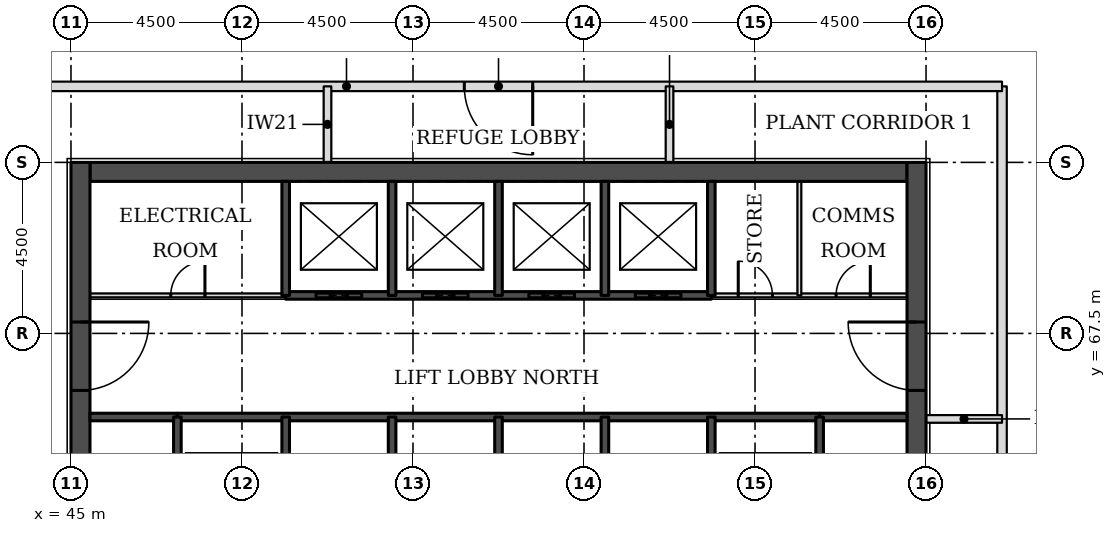
"""IFC4 building model, lengths in metres.
Left out: names, types, materials, properties, quantities, classifications, styles, units other than length and angle.
Written with IfcOpenShell. Run it as: python <this file> out.ifc"""

import sys

from ifc_helpers import new_model, si_unit, direction, frame, frame_2d, origin, place, context, subcontext, project, spatial, rectangle, extrude, element, fill, save


model = new_model("IFC4")
c1 = context("Model", 3, precision=1e-05, world=origin(), true_north=direction((0.0, 1.0)))
c2 = subcontext(c1, "Body", "Model", "MODEL_VIEW")
j1 = project(units=[si_unit("LENGTHUNIT", "METRE"), si_unit("PLANEANGLEUNIT", "RADIAN")], contexts=[c1])
p1 = place(None, origin())
s1 = spatial("IfcSite", under=j1, at=p1, CompositionType="ELEMENT")
p2 = place(p1, origin())
s2 = spatial("IfcBuilding", under=s1, at=p2, CompositionType="ELEMENT")
p3 = place(p2, frame((0.0, 0.0, 69.3)))
s3 = spatial("IfcBuildingStorey", under=s2, at=p3, CompositionType="ELEMENT", Elevation=69.3)
p4 = place(p3, frame((45.5, 71.75, 0.0), z_axis=(0.0, 0.0, 1.0), x_axis=(1.0, 0.0, 0.0)))
e1 = element("IfcWall", 1, at=p4, inside=s3, PredefinedType="SHEAR", context=c2, shape_type="SweptSolid", body=[
    extrude(rectangle(XDim=21.5, YDim=0.5, at=frame_2d((10.75, 0.0))), origin(), (0.0, 0.0, 1.0), 5.0),
])
p5 = place(p3, frame((45.25, 49.5, 0.0), z_axis=(0.0, 0.0, 1.0), x_axis=(0.0, 1.0, 0.0)))
e2 = element("IfcWall", 2, at=p5, inside=s3, PredefinedType="SHEAR", context=c2, shape_type="SweptSolid", body=[
    extrude(rectangle(XDim=22.5, YDim=0.5, at=frame_2d((11.25, 0.0))), origin(), (0.0, 0.0, 1.0), 5.0),
])
p6 = place(p5, frame((4.2, 0.0, 0.0)))
e3 = element("IfcOpeningElement", 3, at=p6, cuts=e2, PredefinedType="OPENING", context=c2, shape_type="SweptSolid", body=[
    extrude(rectangle(XDim=1.8, YDim=2.1, at=frame_2d((0.9, 1.05))), frame((0.0, 0.26, 0.0), z_axis=(0.0, -1.0, 0.0), x_axis=(1.0, 0.0, 0.0)), (0.0, 0.0, 1.0), 0.52),
])
p7 = place(p5, frame((6.9, 0.0, 0.0)))
e4 = element("IfcOpeningElement", 4, at=p7, cuts=e2, PredefinedType="OPENING", context=c2, shape_type="SweptSolid", body=[
    extrude(rectangle(XDim=1.1, YDim=2.1, at=frame_2d((0.55, 1.05))), frame((0.0, 0.26, 0.0), z_axis=(0.0, -1.0, 0.0), x_axis=(1.0, 0.0, 0.0)), (0.0, 0.0, 1.0), 0.52),
])
p8 = place(p5, frame((13.6, 0.0, 0.0)))
e5 = element("IfcOpeningElement", 5, at=p8, cuts=e2, PredefinedType="OPENING", context=c2, shape_type="SweptSolid", body=[
    extrude(rectangle(XDim=1.1, YDim=2.1, at=frame_2d((0.55, 1.05))), frame((0.0, 0.26, 0.0), z_axis=(0.0, -1.0, 0.0), x_axis=(1.0, 0.0, 0.0)), (0.0, 0.0, 1.0), 0.52),
])
p9 = place(p5, frame((16.5, 0.0, 0.0)))
e6 = element("IfcOpeningElement", 6, at=p9, cuts=e2, PredefinedType="OPENING", context=c2, shape_type="SweptSolid", body=[
    extrude(rectangle(XDim=1.8, YDim=2.1, at=frame_2d((0.9, 1.05))), frame((0.0, 0.26, 0.0), z_axis=(0.0, -1.0, 0.0), x_axis=(1.0, 0.0, 0.0)), (0.0, 0.0, 1.0), 0.52),
])
p10 = place(p3, frame((67.25, 49.5, 0.0), z_axis=(0.0, 0.0, 1.0), x_axis=(0.0, 1.0, 0.0)))
e7 = element("IfcWall", 7, at=p10, inside=s3, PredefinedType="SHEAR", context=c2, shape_type="SweptSolid", body=[
    extrude(rectangle(XDim=22.5, YDim=0.5, at=frame_2d((11.25, 0.0))), origin(), (0.0, 0.0, 1.0), 5.0),
])
p11 = place(p10, frame((4.2, 0.0, 0.0)))
e8 = element("IfcOpeningElement", 8, at=p11, cuts=e7, PredefinedType="OPENING", context=c2, shape_type="SweptSolid", body=[
    extrude(rectangle(XDim=1.8, YDim=2.1, at=frame_2d((0.9, 1.05))), frame((0.0, 0.26, 0.0), z_axis=(0.0, -1.0, 0.0), x_axis=(1.0, 0.0, 0.0)), (0.0, 0.0, 1.0), 0.52),
])
p12 = place(p10, frame((6.9, 0.0, 0.0)))
e9 = element("IfcOpeningElement", 9, at=p12, cuts=e7, PredefinedType="OPENING", context=c2, shape_type="SweptSolid", body=[
    extrude(rectangle(XDim=1.1, YDim=2.1, at=frame_2d((0.55, 1.05))), frame((0.0, 0.26, 0.0), z_axis=(0.0, -1.0, 0.0), x_axis=(1.0, 0.0, 0.0)), (0.0, 0.0, 1.0), 0.52),
])
p13 = place(p10, frame((13.6, 0.0, 0.0)))
e10 = element("IfcOpeningElement", 10, at=p13, cuts=e7, PredefinedType="OPENING", context=c2, shape_type="SweptSolid", body=[
    extrude(rectangle(XDim=1.1, YDim=2.1, at=frame_2d((0.55, 1.05))), frame((0.0, 0.26, 0.0), z_axis=(0.0, -1.0, 0.0), x_axis=(1.0, 0.0, 0.0)), (0.0, 0.0, 1.0), 0.52),
])
p14 = place(p10, frame((16.5, 0.0, 0.0)))
e11 = element("IfcOpeningElement", 11, at=p14, cuts=e7, PredefinedType="OPENING", context=c2, shape_type="SweptSolid", body=[
    extrude(rectangle(XDim=1.8, YDim=2.1, at=frame_2d((0.9, 1.05))), frame((0.0, 0.26, 0.0), z_axis=(0.0, -1.0, 0.0), x_axis=(1.0, 0.0, 0.0)), (0.0, 0.0, 1.0), 0.52),
])
p15 = place(p3, frame((69.5, 47.5, 0.0), z_axis=(0.0, 0.0, 1.0), x_axis=(0.0, 1.0, 0.0)))
e12 = element("IfcWall", 12, at=p15, inside=s3, PredefinedType="PARTITIONING", context=c2, shape_type="SweptSolid", body=[
    extrude(rectangle(XDim=26.5, YDim=0.25, at=frame_2d((13.25, 0.0))), origin(), (0.0, 0.0, 1.0), 4.85),
])
p16 = place(p15, frame((12.35, 0.0, 0.0)))
e13 = element("IfcOpeningElement", 13, at=p16, cuts=e12, PredefinedType="OPENING", context=c2, shape_type="SweptSolid", body=[
    extrude(rectangle(XDim=1.8, YDim=2.1, at=frame_2d((0.9, 1.05))), frame((0.0, 0.135, 0.0), z_axis=(0.0, -1.0, 0.0), x_axis=(1.0, 0.0, 0.0)), (0.0, 0.0, 1.0), 0.27),
])
p17 = place(p3, frame((43.0, 74.0, 0.0), z_axis=(0.0, 0.0, 1.0), x_axis=(1.0, 0.0, 0.0)))
e14 = element("IfcWall", 14, at=p17, inside=s3, PredefinedType="PARTITIONING", context=c2, shape_type="SweptSolid", body=[
    extrude(rectangle(XDim=26.5, YDim=0.25, at=frame_2d((13.25, 0.0))), origin(), (0.0, 0.0, 1.0), 4.85),
])
p18 = place(p17, frame((12.35, 0.0, 0.0)))
e15 = element("IfcOpeningElement", 15, at=p18, cuts=e14, PredefinedType="OPENING", context=c2, shape_type="SweptSolid", body=[
    extrude(rectangle(XDim=1.8, YDim=2.1, at=frame_2d((0.9, 1.05))), frame((0.0, 0.135, 0.0), z_axis=(0.0, -1.0, 0.0), x_axis=(1.0, 0.0, 0.0)), (0.0, 0.0, 1.0), 0.27),
])
for number, where, z_axis, x_axis in (
    (16, (67.5, 65.25, 0.0), (0.0, 0.0, 1.0), (1.0, 0.0, 0.0)),
    (17, (51.75, 72.0, 0.0), (0.0, 0.0, 1.0), (0.0, 1.0, 0.0)),
    (18, (60.75, 72.0, 0.0), (0.0, 0.0, 1.0), (0.0, 1.0, 0.0)),
):
    element("IfcWall", number, at=place(p3, frame(where, z_axis=z_axis, x_axis=x_axis)), inside=s3, PredefinedType="PARTITIONING", context=c2, shape_type="SweptSolid", body=[
        extrude(rectangle(XDim=2.0, YDim=0.2, at=frame_2d((1.0, 0.0))), origin(), (0.0, 0.0, 1.0), 4.85),
    ])
for number, where, z_axis, x_axis in (
    (19, (45.5, 65.3, 0.0), (0.0, 0.0, 1.0), (1.0, 0.0, 0.0)),
    (20, (64.7, 65.3, 0.0), (0.0, 0.0, 1.0), (1.0, 0.0, 0.0)),
):
    element("IfcWall", number, at=place(p3, frame(where, z_axis=z_axis, x_axis=x_axis)), inside=s3, PredefinedType="SOLIDWALL", context=c2, shape_type="SweptSolid", body=[
        extrude(rectangle(XDim=2.3, YDim=0.2, at=frame_2d((1.15, 0.0))), origin(), (0.0, 0.0, 1.0), 4.85),
    ])
p19 = place(p3, frame((47.8, 65.3, 0.0), z_axis=(0.0, 0.0, 1.0), x_axis=(1.0, 0.0, 0.0)))
e21 = element("IfcWall", 21, at=p19, inside=s3, PredefinedType="SOLIDWALL", context=c2, shape_type="SweptSolid", body=[
    extrude(rectangle(XDim=16.9, YDim=0.2, at=frame_2d((8.45, 0.0))), origin(), (0.0, 0.0, 1.0), 4.85),
])
p20 = place(p3, frame((45.5, 68.5, 0.0), z_axis=(0.0, 0.0, 1.0), x_axis=(1.0, 0.0, 0.0)))
e22 = element("IfcWall", 22, at=p20, inside=s3, PredefinedType="PARTITIONING", context=c2, shape_type="SweptSolid", body=[
    extrude(rectangle(XDim=5.15, YDim=0.1, at=frame_2d((2.575, 0.0))), origin(), (0.0, 0.0, 1.0), 4.85),
])
p21 = place(p20, frame((2.125, 0.0, 0.0)))
e23 = element("IfcOpeningElement", 23, at=p21, cuts=e22, PredefinedType="OPENING", context=c2, shape_type="SweptSolid", body=[
    extrude(rectangle(XDim=0.9, YDim=2.1, at=frame_2d((0.45, 1.05))), frame((0.0, 0.06, 0.0), z_axis=(0.0, -1.0, 0.0), x_axis=(1.0, 0.0, 0.0)), (0.0, 0.0, 1.0), 0.12),
])
p22 = place(p3, frame((61.85, 68.5, 0.0), z_axis=(0.0, 0.0, 1.0), x_axis=(1.0, 0.0, 0.0)))
e24 = element("IfcWall", 24, at=p22, inside=s3, PredefinedType="PARTITIONING", context=c2, shape_type="SweptSolid", body=[
    extrude(rectangle(XDim=5.15, YDim=0.1, at=frame_2d((2.575, 0.0))), origin(), (0.0, 0.0, 1.0), 4.85),
])
p23 = place(p22, frame((3.284, 0.0, 0.0)))
e25 = element("IfcOpeningElement", 25, at=p23, cuts=e24, PredefinedType="OPENING", context=c2, shape_type="SweptSolid", body=[
    extrude(rectangle(XDim=0.9, YDim=2.1, at=frame_2d((0.45, 1.05))), frame((0.0, 0.06, 0.0), z_axis=(0.0, -1.0, 0.0), x_axis=(1.0, 0.0, 0.0)), (0.0, 0.0, 1.0), 0.12),
])
p24 = place(p22, frame((0.709, 0.0, 0.0)))
e26 = element("IfcOpeningElement", 26, at=p24, cuts=e24, PredefinedType="OPENING", context=c2, shape_type="SweptSolid", body=[
    extrude(rectangle(XDim=0.9, YDim=2.1, at=frame_2d((0.45, 1.05))), frame((0.0, 0.06, 0.0), z_axis=(0.0, -1.0, 0.0), x_axis=(1.0, 0.0, 0.0)), (0.0, 0.0, 1.0), 0.12),
])
p25 = place(p3, frame((50.65, 68.5, 0.0), z_axis=(0.0, 0.0, 1.0), x_axis=(1.0, 0.0, 0.0)))
e27 = element("IfcWall", 27, at=p25, inside=s3, PredefinedType="SOLIDWALL", context=c2, shape_type="SweptSolid", body=[
    extrude(rectangle(XDim=11.2, YDim=0.2, at=frame_2d((5.6, 0.0))), origin(), (0.0, 0.0, 1.0), 4.85),
])
p26 = place(p25, frame((0.8, 0.0, 0.0)))
e28 = element("IfcOpeningElement", 28, at=p26, cuts=e27, PredefinedType="OPENING", context=c2, shape_type="SweptSolid", body=[
    extrude(rectangle(XDim=1.2, YDim=2.1, at=frame_2d((0.6, 1.05))), frame((0.0, 0.11, 0.0), z_axis=(0.0, -1.0, 0.0), x_axis=(1.0, 0.0, 0.0)), (0.0, 0.0, 1.0), 0.22),
])
p27 = place(p25, frame((3.6, 0.0, 0.0)))
e29 = element("IfcOpeningElement", 29, at=p27, cuts=e27, PredefinedType="OPENING", context=c2, shape_type="SweptSolid", body=[
    extrude(rectangle(XDim=1.2, YDim=2.1, at=frame_2d((0.6, 1.05))), frame((0.0, 0.11, 0.0), z_axis=(0.0, -1.0, 0.0), x_axis=(1.0, 0.0, 0.0)), (0.0, 0.0, 1.0), 0.22),
])
p28 = place(p25, frame((6.4, 0.0, 0.0)))
e30 = element("IfcOpeningElement", 30, at=p28, cuts=e27, PredefinedType="OPENING", context=c2, shape_type="SweptSolid", body=[
    extrude(rectangle(XDim=1.2, YDim=2.1, at=frame_2d((0.6, 1.05))), frame((0.0, 0.11, 0.0), z_axis=(0.0, -1.0, 0.0), x_axis=(1.0, 0.0, 0.0)), (0.0, 0.0, 1.0), 0.22),
])
p29 = place(p25, frame((9.2, 0.0, 0.0)))
e31 = element("IfcOpeningElement", 31, at=p29, cuts=e27, PredefinedType="OPENING", context=c2, shape_type="SweptSolid", body=[
    extrude(rectangle(XDim=1.2, YDim=2.1, at=frame_2d((0.6, 1.05))), frame((0.0, 0.11, 0.0), z_axis=(0.0, -1.0, 0.0), x_axis=(1.0, 0.0, 0.0)), (0.0, 0.0, 1.0), 0.22),
])
p30 = place(p3, frame((47.8, 62.0, 0.0), z_axis=(0.0, 0.0, 1.0), x_axis=(0.0, 1.0, 0.0)))
e32 = element("IfcWall", 32, at=p30, inside=s3, PredefinedType="SOLIDWALL", context=c2, shape_type="SweptSolid", body=[
    extrude(rectangle(XDim=3.3, YDim=0.2, at=frame_2d((1.65, 0.0))), origin(), (0.0, 0.0, 1.0), 4.85),
])
p31 = place(p30, frame((1.1, 0.0, 0.0)))
e33 = element("IfcOpeningElement", 33, at=p31, cuts=e32, PredefinedType="OPENING", context=c2, shape_type="SweptSolid", body=[
    extrude(rectangle(XDim=1.1, YDim=2.1, at=frame_2d((0.55, 1.05))), frame((0.0, 0.11, 0.0), z_axis=(0.0, -1.0, 0.0), x_axis=(1.0, 0.0, 0.0)), (0.0, 0.0, 1.0), 0.22),
])
p32 = place(p3, frame((50.65, 62.0, 0.0), z_axis=(0.0, 0.0, 1.0), x_axis=(0.0, 1.0, 0.0)))
e34 = element("IfcWall", 34, at=p32, inside=s3, PredefinedType="SOLIDWALL", context=c2, shape_type="SweptSolid", body=[
    extrude(rectangle(XDim=3.3, YDim=0.2, at=frame_2d((1.65, 0.0))), origin(), (0.0, 0.0, 1.0), 4.85),
])
p33 = place(p3, frame((50.65, 68.5, 0.0), z_axis=(0.0, 0.0, 1.0), x_axis=(0.0, 1.0, 0.0)))
e35 = element("IfcWall", 35, at=p33, inside=s3, PredefinedType="SOLIDWALL", context=c2, shape_type="SweptSolid", body=[
    extrude(rectangle(XDim=3.0, YDim=0.2, at=frame_2d((1.5, 0.0))), origin(), (0.0, 0.0, 1.0), 4.85),
])
p34 = place(p3, frame((53.45, 62.5, 0.0), z_axis=(0.0, 0.0, 1.0), x_axis=(0.0, 1.0, 0.0)))
e36 = element("IfcWall", 36, at=p34, inside=s3, PredefinedType="SOLIDWALL", context=c2, shape_type="SweptSolid", body=[
    extrude(rectangle(XDim=2.8, YDim=0.2, at=frame_2d((1.4, 0.0))), origin(), (0.0, 0.0, 1.0), 4.85),
])
p35 = place(p3, frame((53.45, 68.5, 0.0), z_axis=(0.0, 0.0, 1.0), x_axis=(0.0, 1.0, 0.0)))
e37 = element("IfcWall", 37, at=p35, inside=s3, PredefinedType="SOLIDWALL", context=c2, shape_type="SweptSolid", body=[
    extrude(rectangle(XDim=3.0, YDim=0.2, at=frame_2d((1.5, 0.0))), origin(), (0.0, 0.0, 1.0), 4.85),
])
p36 = place(p3, frame((56.25, 62.5, 0.0), z_axis=(0.0, 0.0, 1.0), x_axis=(0.0, 1.0, 0.0)))
e38 = element("IfcWall", 38, at=p36, inside=s3, PredefinedType="SOLIDWALL", context=c2, shape_type="SweptSolid", body=[
    extrude(rectangle(XDim=2.8, YDim=0.2, at=frame_2d((1.4, 0.0))), origin(), (0.0, 0.0, 1.0), 4.85),
])
p37 = place(p3, frame((56.25, 68.5, 0.0), z_axis=(0.0, 0.0, 1.0), x_axis=(0.0, 1.0, 0.0)))
e39 = element("IfcWall", 39, at=p37, inside=s3, PredefinedType="SOLIDWALL", context=c2, shape_type="SweptSolid", body=[
    extrude(rectangle(XDim=3.0, YDim=0.2, at=frame_2d((1.5, 0.0))), origin(), (0.0, 0.0, 1.0), 4.85),
])
p38 = place(p3, frame((59.05, 62.5, 0.0), z_axis=(0.0, 0.0, 1.0), x_axis=(0.0, 1.0, 0.0)))
e40 = element("IfcWall", 40, at=p38, inside=s3, PredefinedType="SOLIDWALL", context=c2, shape_type="SweptSolid", body=[
    extrude(rectangle(XDim=2.8, YDim=0.2, at=frame_2d((1.4, 0.0))), origin(), (0.0, 0.0, 1.0), 4.85),
])
p39 = place(p3, frame((59.05, 68.5, 0.0), z_axis=(0.0, 0.0, 1.0), x_axis=(0.0, 1.0, 0.0)))
e41 = element("IfcWall", 41, at=p39, inside=s3, PredefinedType="SOLIDWALL", context=c2, shape_type="SweptSolid", body=[
    extrude(rectangle(XDim=3.0, YDim=0.2, at=frame_2d((1.5, 0.0))), origin(), (0.0, 0.0, 1.0), 4.85),
])
p40 = place(p3, frame((61.85, 62.0, 0.0), z_axis=(0.0, 0.0, 1.0), x_axis=(0.0, 1.0, 0.0)))
e42 = element("IfcWall", 42, at=p40, inside=s3, PredefinedType="SOLIDWALL", context=c2, shape_type="SweptSolid", body=[
    extrude(rectangle(XDim=3.3, YDim=0.2, at=frame_2d((1.65, 0.0))), origin(), (0.0, 0.0, 1.0), 4.85),
])
p41 = place(p3, frame((61.85, 68.5, 0.0), z_axis=(0.0, 0.0, 1.0), x_axis=(0.0, 1.0, 0.0)))
e43 = element("IfcWall", 43, at=p41, inside=s3, PredefinedType="SOLIDWALL", context=c2, shape_type="SweptSolid", body=[
    extrude(rectangle(XDim=3.0, YDim=0.2, at=frame_2d((1.5, 0.0))), origin(), (0.0, 0.0, 1.0), 4.85),
])
p42 = place(p3, frame((64.167, 68.5, 0.0), z_axis=(0.0, 0.0, 1.0), x_axis=(0.0, 1.0, 0.0)))
e44 = element("IfcWall", 44, at=p42, inside=s3, PredefinedType="PARTITIONING", context=c2, shape_type="SweptSolid", body=[
    extrude(rectangle(XDim=3.0, YDim=0.1, at=frame_2d((1.5, 0.0))), origin(), (0.0, 0.0, 1.0), 4.85),
])
p43 = place(p3, frame((64.7, 62.0, 0.0), z_axis=(0.0, 0.0, 1.0), x_axis=(0.0, 1.0, 0.0)))
e45 = element("IfcWall", 45, at=p43, inside=s3, PredefinedType="SOLIDWALL", context=c2, shape_type="SweptSolid", body=[
    extrude(rectangle(XDim=3.3, YDim=0.2, at=frame_2d((1.65, 0.0))), origin(), (0.0, 0.0, 1.0), 4.85),
])
p44 = place(p43, frame((1.1, 0.0, 0.0)))
e46 = element("IfcOpeningElement", 46, at=p44, cuts=e45, PredefinedType="OPENING", context=c2, shape_type="SweptSolid", body=[
    extrude(rectangle(XDim=1.1, YDim=2.1, at=frame_2d((0.55, 1.05))), frame((0.0, 0.11, 0.0), z_axis=(0.0, -1.0, 0.0), x_axis=(1.0, 0.0, 0.0)), (0.0, 0.0, 1.0), 0.22),
])
p45 = place(p18, frame((1.8, 0.0, 0.0), z_axis=(0.0, 0.0, 1.0), x_axis=(-1.0, 0.0, 0.0)))
e47 = element("IfcDoor", 47, at=p45, inside=s3, OperationType="SINGLE_SWING_LEFT", PredefinedType="DOOR", context=c2, shape_type="SweptSolid", body=[
    extrude(rectangle(XDim=1.8, YDim=2.1, at=frame_2d((0.9, 1.05))), frame((0.0, 0.025, 0.0), z_axis=(0.0, -1.0, 0.0), x_axis=(1.0, 0.0, 0.0)), (0.0, 0.0, 1.0), 0.05),
])
fill(e15, e47)
p46 = place(p26, origin())
e48 = element("IfcDoor", 48, at=p46, inside=s3, OperationType="DOUBLE_DOOR_SLIDING", PredefinedType="DOOR", context=c2, shape_type="SweptSolid", body=[
    extrude(rectangle(XDim=1.2, YDim=2.1, at=frame_2d((0.6, 1.05))), frame((0.0, 0.025, 0.0), z_axis=(0.0, -1.0, 0.0), x_axis=(1.0, 0.0, 0.0)), (0.0, 0.0, 1.0), 0.05),
])
fill(e28, e48)
p47 = place(p27, origin())
e49 = element("IfcDoor", 49, at=p47, inside=s3, OperationType="DOUBLE_DOOR_SLIDING", PredefinedType="DOOR", context=c2, shape_type="SweptSolid", body=[
    extrude(rectangle(XDim=1.2, YDim=2.1, at=frame_2d((0.6, 1.05))), frame((0.0, 0.025, 0.0), z_axis=(0.0, -1.0, 0.0), x_axis=(1.0, 0.0, 0.0)), (0.0, 0.0, 1.0), 0.05),
])
fill(e29, e49)
p48 = place(p28, origin())
e50 = element("IfcDoor", 50, at=p48, inside=s3, OperationType="DOUBLE_DOOR_SLIDING", PredefinedType="DOOR", context=c2, shape_type="SweptSolid", body=[
    extrude(rectangle(XDim=1.2, YDim=2.1, at=frame_2d((0.6, 1.05))), frame((0.0, 0.025, 0.0), z_axis=(0.0, -1.0, 0.0), x_axis=(1.0, 0.0, 0.0)), (0.0, 0.0, 1.0), 0.05),
])
fill(e30, e50)
p49 = place(p29, origin())
e51 = element("IfcDoor", 51, at=p49, inside=s3, OperationType="DOUBLE_DOOR_SLIDING", PredefinedType="DOOR", context=c2, shape_type="SweptSolid", body=[
    extrude(rectangle(XDim=1.2, YDim=2.1, at=frame_2d((0.6, 1.05))), frame((0.0, 0.025, 0.0), z_axis=(0.0, -1.0, 0.0), x_axis=(1.0, 0.0, 0.0)), (0.0, 0.0, 1.0), 0.05),
])
fill(e31, e51)
p50 = place(p9, frame((1.8, 0.0, 0.0), z_axis=(0.0, 0.0, 1.0), x_axis=(-1.0, 0.0, 0.0)))
e52 = element("IfcDoor", 52, at=p50, inside=s3, OperationType="SINGLE_SWING_LEFT", PredefinedType="DOOR", context=c2, shape_type="SweptSolid", body=[
    extrude(rectangle(XDim=1.8, YDim=2.1, at=frame_2d((0.9, 1.05))), frame((0.0, 0.025, 0.0), z_axis=(0.0, -1.0, 0.0), x_axis=(1.0, 0.0, 0.0)), (0.0, 0.0, 1.0), 0.05),
])
fill(e6, e52)
p51 = place(p14, origin())
e53 = element("IfcDoor", 53, at=p51, inside=s3, OperationType="SINGLE_SWING_RIGHT", PredefinedType="DOOR", context=c2, shape_type="SweptSolid", body=[
    extrude(rectangle(XDim=1.8, YDim=2.1, at=frame_2d((0.9, 1.05))), frame((0.0, 0.025, 0.0), z_axis=(0.0, -1.0, 0.0), x_axis=(1.0, 0.0, 0.0)), (0.0, 0.0, 1.0), 0.05),
])
fill(e11, e53)
p52 = place(p23, origin())
e54 = element("IfcDoor", 54, at=p52, inside=s3, OperationType="SINGLE_SWING_RIGHT", PredefinedType="DOOR", context=c2, shape_type="SweptSolid", body=[
    extrude(rectangle(XDim=0.9, YDim=2.1, at=frame_2d((0.45, 1.05))), frame((0.0, 0.025, 0.0), z_axis=(0.0, -1.0, 0.0), x_axis=(1.0, 0.0, 0.0)), (0.0, 0.0, 1.0), 0.05),
])
fill(e25, e54)
p53 = place(p24, origin())
e55 = element("IfcDoor", 55, at=p53, inside=s3, OperationType="SINGLE_SWING_LEFT", PredefinedType="DOOR", context=c2, shape_type="SweptSolid", body=[
    extrude(rectangle(XDim=0.9, YDim=2.1, at=frame_2d((0.45, 1.05))), frame((0.0, 0.025, 0.0), z_axis=(0.0, -1.0, 0.0), x_axis=(1.0, 0.0, 0.0)), (0.0, 0.0, 1.0), 0.05),
])
fill(e26, e55)
p54 = place(p21, origin())
e56 = element("IfcDoor", 56, at=p54, inside=s3, OperationType="SINGLE_SWING_RIGHT", PredefinedType="DOOR", context=c2, shape_type="SweptSolid", body=[
    extrude(rectangle(XDim=0.9, YDim=2.1, at=frame_2d((0.45, 1.05))), frame((0.0, 0.025, 0.0), z_axis=(0.0, -1.0, 0.0), x_axis=(1.0, 0.0, 0.0)), (0.0, 0.0, 1.0), 0.05),
])
fill(e23, e56)
save(model, sys.argv[1])
